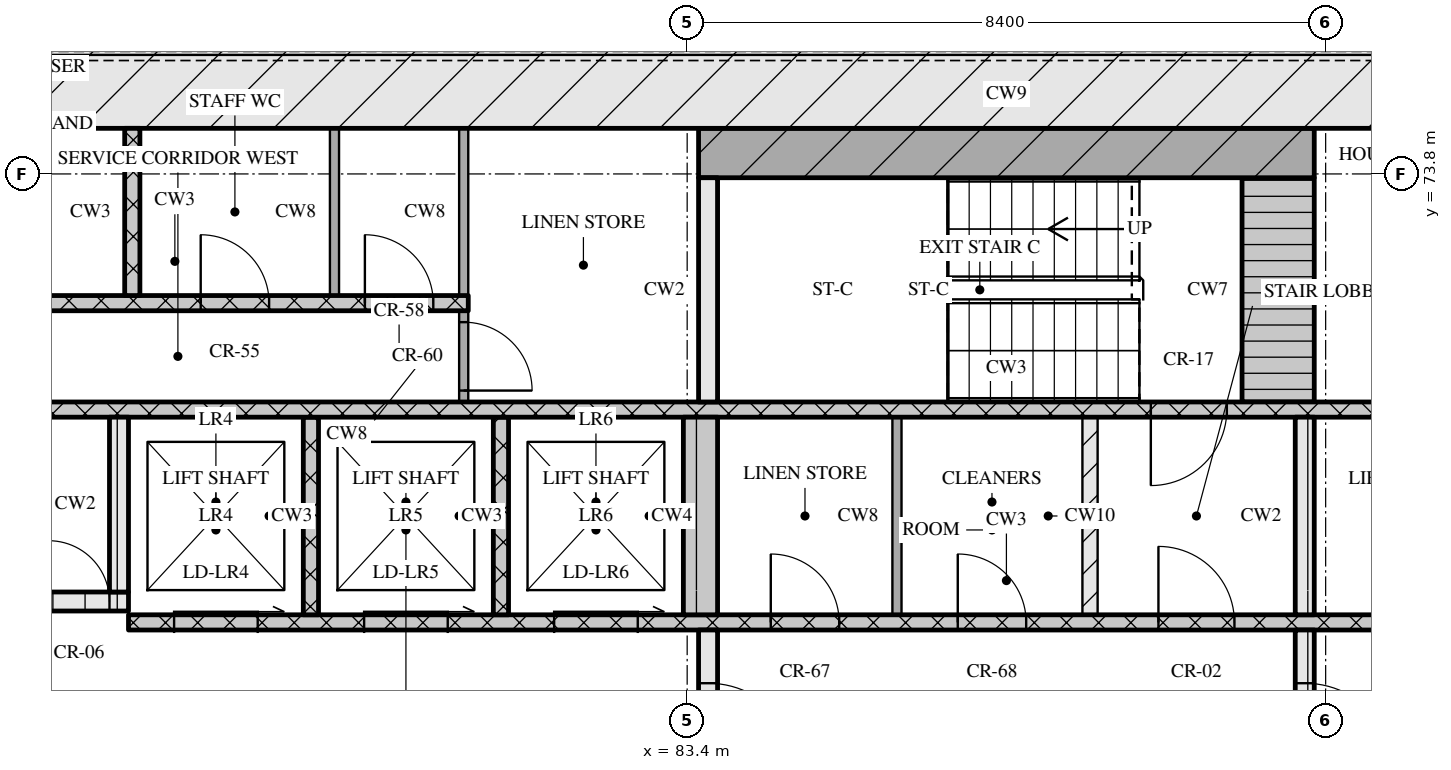
"""IFC4 building model, lengths in metres.
Left out: names, types, materials, properties, quantities, classifications, styles, units other than length and angle.
Written with IfcOpenShell. Run it as: python <this file> out.ifc"""

import sys

from ifc_helpers import new_model, si_unit, direction, frame, frame_2d, origin, place, context, subcontext, project, spatial, rectangle, extrude, element, fill, save


model = new_model("IFC4")
c1 = context("Model", 3, precision=1e-05, world=origin(), true_north=direction((0.0, 1.0)))
c2 = subcontext(c1, "Body", "Model", "MODEL_VIEW")
j1 = project(units=[si_unit("LENGTHUNIT", "METRE"), si_unit("PLANEANGLEUNIT", "RADIAN")], contexts=[c1])
p1 = place(None, origin())
s1 = spatial("IfcSite", under=j1, at=p1, CompositionType="ELEMENT")
p2 = place(p1, origin())
s2 = spatial("IfcBuilding", under=s1, at=p2, CompositionType="ELEMENT")
p3 = place(p2, frame((0.0, 0.0, 66.0)))
s3 = spatial("IfcBuildingStorey", under=s2, at=p3, CompositionType="ELEMENT", Elevation=66.0)
p4 = place(p3, frame((66.6, 75.0, 0.0), z_axis=(0.0, 0.0, 1.0), x_axis=(1.0, 0.0, 0.0)))
e1 = element("IfcWall", 1, at=p4, inside=s3, PredefinedType="SOLIDWALL", context=c2, shape_type="SweptSolid", body=[
    extrude(rectangle(XDim=42.0, YDim=1.2, at=frame_2d((21.0, 0.0))), origin(), (0.0, 0.0, 1.0), 3.32),
])
p5 = place(p3, frame((83.675, 65.2, 0.0), z_axis=(0.0, 0.0, 1.0), x_axis=(0.0, 1.0, 0.0)))
e2 = element("IfcWall", 2, at=p5, inside=s3, PredefinedType="SOLIDWALL", context=c2, shape_type="SweptSolid", body=[
    extrude(rectangle(XDim=2.6, YDim=0.25, at=frame_2d((1.3, 0.0))), origin(), (0.0, 0.0, 1.0), 3.32),
])
p6 = place(p5, frame((0.7, 0.0, 0.0)))
e3 = element("IfcOpeningElement", 3, at=p6, cuts=e2, PredefinedType="OPENING", context=c2, shape_type="SweptSolid", body=[
    extrude(rectangle(XDim=1.2, YDim=2.1, at=frame_2d((0.6, 1.05))), frame((0.0, 0.135, 0.0), z_axis=(0.0, -1.0, 0.0), x_axis=(1.0, 0.0, 0.0)), (0.0, 0.0, 1.0), 0.27),
])
p7 = place(p3, frame((91.525, 65.2, 0.0), z_axis=(0.0, 0.0, 1.0), x_axis=(0.0, 1.0, 0.0)))
e4 = element("IfcWall", 4, at=p7, inside=s3, PredefinedType="SOLIDWALL", context=c2, shape_type="SweptSolid", body=[
    extrude(rectangle(XDim=2.6, YDim=0.25, at=frame_2d((1.3, 0.0))), origin(), (0.0, 0.0, 1.0), 3.32),
])
p8 = place(p7, frame((0.7, 0.0, 0.0)))
e5 = element("IfcOpeningElement", 5, at=p8, cuts=e4, PredefinedType="OPENING", context=c2, shape_type="SweptSolid", body=[
    extrude(rectangle(XDim=1.2, YDim=2.1, at=frame_2d((0.6, 1.05))), frame((0.0, 0.135, 0.0), z_axis=(0.0, -1.0, 0.0), x_axis=(1.0, 0.0, 0.0)), (0.0, 0.0, 1.0), 0.27),
])
p9 = place(p3, frame((76.05, 67.9, 0.0), z_axis=(0.0, 0.0, 1.0), x_axis=(1.0, 0.0, 0.0)))
e6 = element("IfcWall", 6, at=p9, inside=s3, PredefinedType="SOLIDWALL", context=c2, shape_type="SweptSolid", body=[
    extrude(rectangle(XDim=23.1, YDim=0.2, at=frame_2d((11.55, 0.0))), origin(), (0.0, 0.0, 1.0), 3.32),
])
p10 = place(p9, frame((0.6, 0.0, 0.0)))
e7 = element("IfcOpeningElement", 7, at=p10, cuts=e6, PredefinedType="OPENING", context=c2, shape_type="SweptSolid", body=[
    extrude(rectangle(XDim=1.1, YDim=2.1, at=frame_2d((0.55, 1.05))), frame((0.0, 0.11, 0.0), z_axis=(0.0, -1.0, 0.0), x_axis=(1.0, 0.0, 0.0)), (0.0, 0.0, 1.0), 0.22),
])
p11 = place(p9, frame((3.1, 0.0, 0.0)))
e8 = element("IfcOpeningElement", 8, at=p11, cuts=e6, PredefinedType="OPENING", context=c2, shape_type="SweptSolid", body=[
    extrude(rectangle(XDim=1.1, YDim=2.1, at=frame_2d((0.55, 1.05))), frame((0.0, 0.11, 0.0), z_axis=(0.0, -1.0, 0.0), x_axis=(1.0, 0.0, 0.0)), (0.0, 0.0, 1.0), 0.22),
])
p12 = place(p9, frame((5.6, 0.0, 0.0)))
e9 = element("IfcOpeningElement", 9, at=p12, cuts=e6, PredefinedType="OPENING", context=c2, shape_type="SweptSolid", body=[
    extrude(rectangle(XDim=1.1, YDim=2.1, at=frame_2d((0.55, 1.05))), frame((0.0, 0.11, 0.0), z_axis=(0.0, -1.0, 0.0), x_axis=(1.0, 0.0, 0.0)), (0.0, 0.0, 1.0), 0.22),
])
p13 = place(p9, frame((8.45, 0.0, 0.0)))
e10 = element("IfcOpeningElement", 10, at=p13, cuts=e6, PredefinedType="OPENING", context=c2, shape_type="SweptSolid", body=[
    extrude(rectangle(XDim=0.9, YDim=2.1, at=frame_2d((0.45, 1.05))), frame((0.0, 0.11, 0.0), z_axis=(0.0, -1.0, 0.0), x_axis=(1.0, 0.0, 0.0)), (0.0, 0.0, 1.0), 0.22),
])
p14 = place(p9, frame((10.91, 0.0, 0.0)))
e11 = element("IfcOpeningElement", 11, at=p14, cuts=e6, PredefinedType="OPENING", context=c2, shape_type="SweptSolid", body=[
    extrude(rectangle(XDim=0.9, YDim=2.1, at=frame_2d((0.45, 1.05))), frame((0.0, 0.11, 0.0), z_axis=(0.0, -1.0, 0.0), x_axis=(1.0, 0.0, 0.0)), (0.0, 0.0, 1.0), 0.22),
])
p15 = place(p9, frame((13.55, 0.0, 0.0)))
e12 = element("IfcOpeningElement", 12, at=p15, cuts=e6, PredefinedType="OPENING", context=c2, shape_type="SweptSolid", body=[
    extrude(rectangle(XDim=1.0, YDim=2.1, at=frame_2d((0.5, 1.05))), frame((0.0, 0.11, 0.0), z_axis=(0.0, -1.0, 0.0), x_axis=(1.0, 0.0, 0.0)), (0.0, 0.0, 1.0), 0.22),
])
for number, where, z_axis, x_axis in (
    (13, (78.45, 68.0, 0.0), (0.0, 0.0, 1.0), (0.0, 1.0, 0.0)),
    (14, (80.95, 68.0, 0.0), (0.0, 0.0, 1.0), (0.0, 1.0, 0.0)),
):
    element("IfcWall", number, at=place(p3, frame(where, z_axis=z_axis, x_axis=x_axis)), inside=s3, PredefinedType="SOLIDWALL", context=c2, shape_type="SweptSolid", body=[
        extrude(rectangle(XDim=2.6, YDim=0.2, at=frame_2d((1.3, 0.0))), origin(), (0.0, 0.0, 1.0), 3.32),
    ])
p16 = place(p3, frame((83.575, 68.0, 0.0), z_axis=(0.0, 0.0, 1.0), x_axis=(0.0, 1.0, 0.0)))
e15 = element("IfcWall", 15, at=p16, inside=s3, PredefinedType="SOLIDWALL", context=c2, shape_type="SweptSolid", body=[
    extrude(rectangle(XDim=2.6, YDim=0.45, at=frame_2d((1.3, 0.0))), origin(), (0.0, 0.0, 1.0), 3.32),
])
p17 = place(p3, frame((86.16, 68.0, 0.0), z_axis=(0.0, 0.0, 1.0), x_axis=(0.0, 1.0, 0.0)))
e16 = element("IfcWall", 16, at=p17, inside=s3, PredefinedType="PARTITIONING", context=c2, shape_type="SweptSolid", body=[
    extrude(rectangle(XDim=2.6, YDim=0.12, at=frame_2d((1.3, 0.0))), origin(), (0.0, 0.0, 1.0), 3.32),
])
p18 = place(p3, frame((88.7, 68.0, 0.0), z_axis=(0.0, 0.0, 1.0), x_axis=(0.0, 1.0, 0.0)))
e17 = element("IfcWall", 17, at=p18, inside=s3, PredefinedType="PARTITIONING", context=c2, shape_type="SweptSolid", body=[
    extrude(rectangle(XDim=2.6, YDim=0.2, at=frame_2d((1.3, 0.0))), origin(), (0.0, 0.0, 1.0), 3.32),
])
p19 = place(p3, frame((91.525, 68.0, 0.0), z_axis=(0.0, 0.0, 1.0), x_axis=(0.0, 1.0, 0.0)))
e18 = element("IfcWall", 18, at=p19, inside=s3, PredefinedType="SOLIDWALL", context=c2, shape_type="SweptSolid", body=[
    extrude(rectangle(XDim=2.6, YDim=0.25, at=frame_2d((1.3, 0.0))), origin(), (0.0, 0.0, 1.0), 3.32),
])
p20 = place(p3, frame((67.8, 68.175, 0.0), z_axis=(0.0, 0.0, 1.0), x_axis=(1.0, 0.0, 0.0)))
e19 = element("IfcWall", 19, at=p20, inside=s3, PredefinedType="SOLIDWALL", context=c2, shape_type="SweptSolid", body=[
    extrude(rectangle(XDim=8.25, YDim=0.25, at=frame_2d((4.125, 0.0))), origin(), (0.0, 0.0, 1.0), 3.32),
])
p21 = place(p20, frame((5.7, 0.0, 0.0)))
e20 = element("IfcOpeningElement", 20, at=p21, cuts=e19, PredefinedType="OPENING", context=c2, shape_type="SweptSolid", body=[
    extrude(rectangle(XDim=1.0, YDim=2.1, at=frame_2d((0.5, 1.05))), frame((0.0, 0.135, 0.0), z_axis=(0.0, -1.0, 0.0), x_axis=(1.0, 0.0, 0.0)), (0.0, 0.0, 1.0), 0.27),
])
p22 = place(p20, frame((7.2, 0.0, 0.0)))
e21 = element("IfcOpeningElement", 21, at=p22, cuts=e19, PredefinedType="OPENING", context=c2, shape_type="SweptSolid", body=[
    extrude(rectangle(XDim=0.8, YDim=2.1, at=frame_2d((0.4, 1.05))), frame((0.0, 0.135, 0.0), z_axis=(0.0, -1.0, 0.0), x_axis=(1.0, 0.0, 0.0)), (0.0, 0.0, 1.0), 0.27),
])
p23 = place(p3, frame((75.925, 68.3, 0.0), z_axis=(0.0, 0.0, 1.0), x_axis=(0.0, 1.0, 0.0)))
e22 = element("IfcWall", 22, at=p23, inside=s3, PredefinedType="SOLIDWALL", context=c2, shape_type="SweptSolid", body=[
    extrude(rectangle(XDim=2.3, YDim=0.25, at=frame_2d((1.15, 0.0))), origin(), (0.0, 0.0, 1.0), 3.32),
])
p24 = place(p3, frame((67.8, 70.7, 0.0), z_axis=(0.0, 0.0, 1.0), x_axis=(1.0, 0.0, 0.0)))
e23 = element("IfcWall", 23, at=p24, inside=s3, PredefinedType="SOLIDWALL", context=c2, shape_type="SweptSolid", body=[
    extrude(rectangle(XDim=39.6, YDim=0.2, at=frame_2d((19.8, 0.0))), origin(), (0.0, 0.0, 1.0), 3.32),
])
p25 = place(p24, frame((0.65, 0.0, 0.0)))
e24 = element("IfcOpeningElement", 24, at=p25, cuts=e23, PredefinedType="OPENING", context=c2, shape_type="SweptSolid", body=[
    extrude(rectangle(XDim=1.1, YDim=2.1, at=frame_2d((0.55, 1.05))), frame((0.0, 0.11, 0.0), z_axis=(0.0, -1.0, 0.0), x_axis=(1.0, 0.0, 0.0)), (0.0, 0.0, 1.0), 0.22),
])
p26 = place(p24, frame((3.25, 0.0, 0.0)))
e25 = element("IfcOpeningElement", 25, at=p26, cuts=e23, PredefinedType="OPENING", context=c2, shape_type="SweptSolid", body=[
    extrude(rectangle(XDim=1.1, YDim=2.1, at=frame_2d((0.55, 1.05))), frame((0.0, 0.11, 0.0), z_axis=(0.0, -1.0, 0.0), x_axis=(1.0, 0.0, 0.0)), (0.0, 0.0, 1.0), 0.22),
])
p27 = place(p24, frame((5.9, 0.0, 0.0)))
e26 = element("IfcOpeningElement", 26, at=p27, cuts=e23, PredefinedType="OPENING", context=c2, shape_type="SweptSolid", body=[
    extrude(rectangle(XDim=1.0, YDim=2.1, at=frame_2d((0.5, 1.05))), frame((0.0, 0.11, 0.0), z_axis=(0.0, -1.0, 0.0), x_axis=(1.0, 0.0, 0.0)), (0.0, 0.0, 1.0), 0.22),
])
p28 = place(p24, frame((21.7, 0.0, 0.0)))
e27 = element("IfcOpeningElement", 27, at=p28, cuts=e23, PredefinedType="OPENING", context=c2, shape_type="SweptSolid", body=[
    extrude(rectangle(XDim=1.0, YDim=2.1, at=frame_2d((0.5, 1.05))), frame((0.0, 0.11, 0.0), z_axis=(0.0, -1.0, 0.0), x_axis=(1.0, 0.0, 0.0)), (0.0, 0.0, 1.0), 0.22),
])
p29 = place(p24, frame((32.7, 0.0, 0.0)))
e28 = element("IfcOpeningElement", 28, at=p29, cuts=e23, PredefinedType="OPENING", context=c2, shape_type="SweptSolid", body=[
    extrude(rectangle(XDim=1.0, YDim=2.1, at=frame_2d((0.5, 1.05))), frame((0.0, 0.11, 0.0), z_axis=(0.0, -1.0, 0.0), x_axis=(1.0, 0.0, 0.0)), (0.0, 0.0, 1.0), 0.22),
])
p30 = place(p24, frame((35.25, 0.0, 0.0)))
e29 = element("IfcOpeningElement", 29, at=p30, cuts=e23, PredefinedType="OPENING", context=c2, shape_type="SweptSolid", body=[
    extrude(rectangle(XDim=1.1, YDim=2.1, at=frame_2d((0.55, 1.05))), frame((0.0, 0.11, 0.0), z_axis=(0.0, -1.0, 0.0), x_axis=(1.0, 0.0, 0.0)), (0.0, 0.0, 1.0), 0.22),
])
p31 = place(p24, frame((37.85, 0.0, 0.0)))
e30 = element("IfcOpeningElement", 30, at=p31, cuts=e23, PredefinedType="OPENING", context=c2, shape_type="SweptSolid", body=[
    extrude(rectangle(XDim=1.1, YDim=2.1, at=frame_2d((0.55, 1.05))), frame((0.0, 0.11, 0.0), z_axis=(0.0, -1.0, 0.0), x_axis=(1.0, 0.0, 0.0)), (0.0, 0.0, 1.0), 0.22),
])
p32 = place(p3, frame((80.46, 70.8, 0.0), z_axis=(0.0, 0.0, 1.0), x_axis=(0.0, 1.0, 0.0)))
e31 = element("IfcWall", 31, at=p32, inside=s3, PredefinedType="PARTITIONING", context=c2, shape_type="SweptSolid", body=[
    extrude(rectangle(XDim=1.2, YDim=0.12, at=frame_2d((0.6, 0.0))), origin(), (0.0, 0.0, 1.0), 3.32),
])
p33 = place(p32, frame((0.15, 0.0, 0.0)))
e32 = element("IfcOpeningElement", 32, at=p33, cuts=e31, PredefinedType="OPENING", context=c2, shape_type="SweptSolid", body=[
    extrude(rectangle(XDim=0.9, YDim=2.1, at=frame_2d((0.45, 1.05))), frame((0.0, 0.07, 0.0), z_axis=(0.0, -1.0, 0.0), x_axis=(1.0, 0.0, 0.0)), (0.0, 0.0, 1.0), 0.14),
])
p34 = place(p3, frame((83.675, 70.8, 0.0), z_axis=(0.0, 0.0, 1.0), x_axis=(0.0, 1.0, 0.0)))
e33 = element("IfcWall", 33, at=p34, inside=s3, PredefinedType="SOLIDWALL", context=c2, shape_type="SweptSolid", body=[
    extrude(rectangle(XDim=2.95, YDim=0.25, at=frame_2d((1.475, 0.0))), origin(), (0.0, 0.0, 1.0), 3.32),
])
p35 = place(p3, frame((91.175, 70.8, 0.0), z_axis=(0.0, 0.0, 1.0), x_axis=(0.0, 1.0, 0.0)))
e34 = element("IfcWall", 34, at=p35, inside=s3, PredefinedType="SOLIDWALL", context=c2, shape_type="SweptSolid", body=[
    extrude(rectangle(XDim=2.95, YDim=0.95, at=frame_2d((1.475, 0.0))), origin(), (0.0, 0.0, 1.0), 3.32),
])
p36 = place(p3, frame((72.8, 72.1, 0.0), z_axis=(0.0, 0.0, 1.0), x_axis=(1.0, 0.0, 0.0)))
e35 = element("IfcWall", 35, at=p36, inside=s3, PredefinedType="SOLIDWALL", context=c2, shape_type="SweptSolid", body=[
    extrude(rectangle(XDim=7.72, YDim=0.2, at=frame_2d((3.86, 0.0))), origin(), (0.0, 0.0, 1.0), 3.32),
])
p37 = place(p36, frame((1.25, 0.0, 0.0)))
e36 = element("IfcOpeningElement", 36, at=p37, cuts=e35, PredefinedType="OPENING", context=c2, shape_type="SweptSolid", body=[
    extrude(rectangle(XDim=0.9, YDim=2.1, at=frame_2d((0.45, 1.05))), frame((0.0, 0.11, 0.0), z_axis=(0.0, -1.0, 0.0), x_axis=(1.0, 0.0, 0.0)), (0.0, 0.0, 1.0), 0.22),
])
p38 = place(p36, frame((4.2, 0.0, 0.0)))
e37 = element("IfcOpeningElement", 37, at=p38, cuts=e35, PredefinedType="OPENING", context=c2, shape_type="SweptSolid", body=[
    extrude(rectangle(XDim=0.9, YDim=2.1, at=frame_2d((0.45, 1.05))), frame((0.0, 0.11, 0.0), z_axis=(0.0, -1.0, 0.0), x_axis=(1.0, 0.0, 0.0)), (0.0, 0.0, 1.0), 0.22),
])
p39 = place(p36, frame((6.36, 0.0, 0.0)))
e38 = element("IfcOpeningElement", 38, at=p39, cuts=e35, PredefinedType="OPENING", context=c2, shape_type="SweptSolid", body=[
    extrude(rectangle(XDim=0.9, YDim=2.1, at=frame_2d((0.45, 1.05))), frame((0.0, 0.11, 0.0), z_axis=(0.0, -1.0, 0.0), x_axis=(1.0, 0.0, 0.0)), (0.0, 0.0, 1.0), 0.22),
])
p40 = place(p3, frame((76.1, 72.2, 0.0), z_axis=(0.0, 0.0, 1.0), x_axis=(0.0, 1.0, 0.0)))
e39 = element("IfcWall", 39, at=p40, inside=s3, PredefinedType="SOLIDWALL", context=c2, shape_type="SweptSolid", body=[
    extrude(rectangle(XDim=2.2, YDim=0.2, at=frame_2d((1.1, 0.0))), origin(), (0.0, 0.0, 1.0), 3.32),
])
for number, where, z_axis, x_axis in (
    (40, (78.76, 72.2, 0.0), (0.0, 0.0, 1.0), (0.0, 1.0, 0.0)),
    (41, (80.46, 72.2, 0.0), (0.0, 0.0, 1.0), (0.0, 1.0, 0.0)),
):
    element("IfcWall", number, at=place(p3, frame(where, z_axis=z_axis, x_axis=x_axis)), inside=s3, PredefinedType="PARTITIONING", context=c2, shape_type="SweptSolid", body=[
        extrude(rectangle(XDim=2.2, YDim=0.12, at=frame_2d((1.1, 0.0))), origin(), (0.0, 0.0, 1.0), 3.32),
    ])
p41 = place(p3, frame((83.55, 74.075, 0.0), z_axis=(0.0, 0.0, 1.0), x_axis=(1.0, 0.0, 0.0)))
e42 = element("IfcWall", 42, at=p41, inside=s3, PredefinedType="SOLIDWALL", context=c2, shape_type="SweptSolid", body=[
    extrude(rectangle(XDim=8.1, YDim=0.65, at=frame_2d((4.05, 0.0))), origin(), (0.0, 0.0, 1.0), 3.32),
])
p42 = place(p6, origin())
e43 = element("IfcDoor", 43, at=p42, inside=s3, OperationType="SINGLE_SWING_RIGHT", PredefinedType="DOOR", context=c2, shape_type="SweptSolid", body=[
    extrude(rectangle(XDim=1.2, YDim=2.1, at=frame_2d((0.6, 1.05))), frame((0.0, 0.025, 0.0), z_axis=(0.0, -1.0, 0.0), x_axis=(1.0, 0.0, 0.0)), (0.0, 0.0, 1.0), 0.05),
])
fill(e3, e43)
p43 = place(p8, origin())
e44 = element("IfcDoor", 44, at=p43, inside=s3, OperationType="SINGLE_SWING_RIGHT", PredefinedType="DOOR", context=c2, shape_type="SweptSolid", body=[
    extrude(rectangle(XDim=1.2, YDim=2.1, at=frame_2d((0.6, 1.05))), frame((0.0, 0.025, 0.0), z_axis=(0.0, -1.0, 0.0), x_axis=(1.0, 0.0, 0.0)), (0.0, 0.0, 1.0), 0.05),
])
fill(e5, e44)
p44 = place(p10, origin())
e45 = element("IfcDoor", 45, at=p44, inside=s3, OperationType="SLIDING_TO_RIGHT", PredefinedType="DOOR", context=c2, shape_type="SweptSolid", body=[
    extrude(rectangle(XDim=1.1, YDim=2.1, at=frame_2d((0.55, 1.05))), frame((0.0, 0.025, 0.0), z_axis=(0.0, -1.0, 0.0), x_axis=(1.0, 0.0, 0.0)), (0.0, 0.0, 1.0), 0.05),
])
fill(e7, e45)
p45 = place(p11, origin())
e46 = element("IfcDoor", 46, at=p45, inside=s3, OperationType="SLIDING_TO_RIGHT", PredefinedType="DOOR", context=c2, shape_type="SweptSolid", body=[
    extrude(rectangle(XDim=1.1, YDim=2.1, at=frame_2d((0.55, 1.05))), frame((0.0, 0.025, 0.0), z_axis=(0.0, -1.0, 0.0), x_axis=(1.0, 0.0, 0.0)), (0.0, 0.0, 1.0), 0.05),
])
fill(e8, e46)
p46 = place(p12, origin())
e47 = element("IfcDoor", 47, at=p46, inside=s3, OperationType="SLIDING_TO_RIGHT", PredefinedType="DOOR", context=c2, shape_type="SweptSolid", body=[
    extrude(rectangle(XDim=1.1, YDim=2.1, at=frame_2d((0.55, 1.05))), frame((0.0, 0.025, 0.0), z_axis=(0.0, -1.0, 0.0), x_axis=(1.0, 0.0, 0.0)), (0.0, 0.0, 1.0), 0.05),
])
fill(e9, e47)
p47 = place(p13, origin())
e48 = element("IfcDoor", 48, at=p47, inside=s3, OperationType="SINGLE_SWING_LEFT", PredefinedType="DOOR", context=c2, shape_type="SweptSolid", body=[
    extrude(rectangle(XDim=0.9, YDim=2.1, at=frame_2d((0.45, 1.05))), frame((0.0, 0.025, 0.0), z_axis=(0.0, -1.0, 0.0), x_axis=(1.0, 0.0, 0.0)), (0.0, 0.0, 1.0), 0.05),
])
fill(e10, e48)
p48 = place(p14, origin())
e49 = element("IfcDoor", 49, at=p48, inside=s3, OperationType="SINGLE_SWING_LEFT", PredefinedType="DOOR", context=c2, shape_type="SweptSolid", body=[
    extrude(rectangle(XDim=0.9, YDim=2.1, at=frame_2d((0.45, 1.05))), frame((0.0, 0.025, 0.0), z_axis=(0.0, -1.0, 0.0), x_axis=(1.0, 0.0, 0.0)), (0.0, 0.0, 1.0), 0.05),
])
fill(e11, e49)
p49 = place(p15, origin())
e50 = element("IfcDoor", 50, at=p49, inside=s3, OperationType="SINGLE_SWING_LEFT", PredefinedType="DOOR", context=c2, shape_type="SweptSolid", body=[
    extrude(rectangle(XDim=1.0, YDim=2.1, at=frame_2d((0.5, 1.05))), frame((0.0, 0.025, 0.0), z_axis=(0.0, -1.0, 0.0), x_axis=(1.0, 0.0, 0.0)), (0.0, 0.0, 1.0), 0.05),
])
fill(e12, e50)
p50 = place(p22, origin())
e51 = element("IfcDoor", 51, at=p50, inside=s3, OperationType="SINGLE_SWING_LEFT", PredefinedType="DOOR", context=c2, shape_type="SweptSolid", body=[
    extrude(rectangle(XDim=0.8, YDim=2.1, at=frame_2d((0.4, 1.05))), frame((0.0, 0.025, 0.0), z_axis=(0.0, -1.0, 0.0), x_axis=(1.0, 0.0, 0.0)), (0.0, 0.0, 1.0), 0.05),
])
fill(e21, e51)
p51 = place(p28, origin())
e52 = element("IfcDoor", 52, at=p51, inside=s3, OperationType="SINGLE_SWING_RIGHT", PredefinedType="DOOR", context=c2, shape_type="SweptSolid", body=[
    extrude(rectangle(XDim=1.0, YDim=2.1, at=frame_2d((0.5, 1.05))), frame((0.0, 0.025, 0.0), z_axis=(0.0, -1.0, 0.0), x_axis=(1.0, 0.0, 0.0)), (0.0, 0.0, 1.0), 0.05),
])
fill(e27, e52)
p52 = place(p33, origin())
e53 = element("IfcDoor", 53, at=p52, inside=s3, OperationType="SINGLE_SWING_RIGHT", PredefinedType="DOOR", context=c2, shape_type="SweptSolid", body=[
    extrude(rectangle(XDim=0.9, YDim=2.1, at=frame_2d((0.45, 1.05))), frame((0.0, 0.025, 0.0), z_axis=(0.0, -1.0, 0.0), x_axis=(1.0, 0.0, 0.0)), (0.0, 0.0, 1.0), 0.05),
])
fill(e32, e53)
p53 = place(p38, origin())
e54 = element("IfcDoor", 54, at=p53, inside=s3, OperationType="SINGLE_SWING_LEFT", PredefinedType="DOOR", context=c2, shape_type="SweptSolid", body=[
    extrude(rectangle(XDim=0.9, YDim=2.1, at=frame_2d((0.45, 1.05))), frame((0.0, 0.025, 0.0), z_axis=(0.0, -1.0, 0.0), x_axis=(1.0, 0.0, 0.0)), (0.0, 0.0, 1.0), 0.05),
])
fill(e37, e54)
p54 = place(p39, origin())
e55 = element("IfcDoor", 55, at=p54, inside=s3, OperationType="SINGLE_SWING_LEFT", PredefinedType="DOOR", context=c2, shape_type="SweptSolid", body=[
    extrude(rectangle(XDim=0.9, YDim=2.1, at=frame_2d((0.45, 1.05))), frame((0.0, 0.025, 0.0), z_axis=(0.0, -1.0, 0.0), x_axis=(1.0, 0.0, 0.0)), (0.0, 0.0, 1.0), 0.05),
])
fill(e38, e55)
save(model, sys.argv[1])
